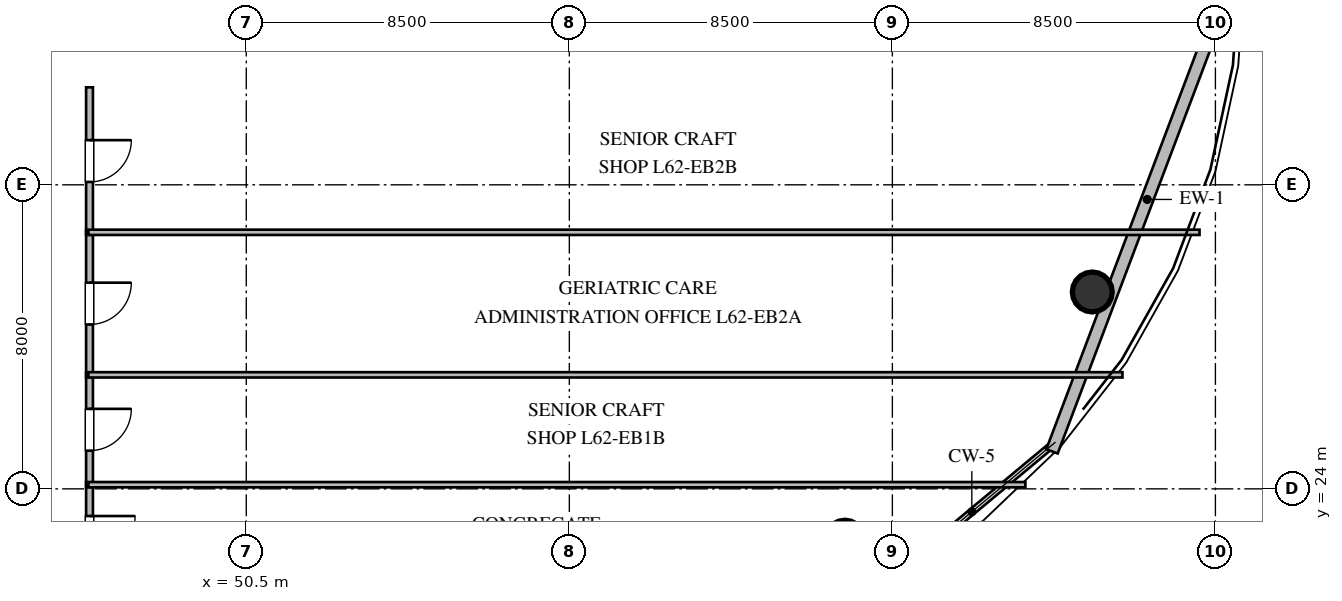
"""IFC4 building model, lengths in metres.
Left out: names, types, materials, properties, quantities, classifications, styles, units other than length and angle.
Written with IfcOpenShell. Run it as: python <this file> out.ifc"""

import sys

from ifc_helpers import new_model, si_unit, direction, frame, frame_2d, origin, origin_2d, place, context, subcontext, project, spatial, rectangle, circle, extrude, element, fill, save


model = new_model("IFC4")
c1 = context("Model", 3, precision=1e-05, world=origin(), true_north=direction((0.0, 1.0)))
c2 = subcontext(c1, "Body", "Model", "MODEL_VIEW")
j1 = project(units=[si_unit("LENGTHUNIT", "METRE"), si_unit("PLANEANGLEUNIT", "RADIAN")], contexts=[c1])
p1 = place(None, origin())
s1 = spatial("IfcSite", under=j1, at=p1, CompositionType="ELEMENT")
p2 = place(p1, origin())
s2 = spatial("IfcBuilding", under=s1, at=p2, CompositionType="ELEMENT")
p3 = place(p2, frame((0.0, 0.0, 235.2)))
s3 = spatial("IfcBuildingStorey", under=s2, at=p3, CompositionType="ELEMENT", Elevation=235.2)
for number, where, z_axis, x_axis in (
    (1, (66.25, 22.65, 0.0), (0.0, 0.0, 1.0), (1.0, 0.0, 0.0)),
    (2, (72.76, 29.18, 0.0), (0.0, 0.0, 1.0), (1.0, 0.0, 0.0)),
):
    element("IfcColumn", number, at=place(p3, frame(where, z_axis=z_axis, x_axis=x_axis)), inside=s3, PredefinedType="COLUMN", context=c2, shape_type="SweptSolid", body=[
        extrude(circle(Radius=0.525, at=origin_2d()), origin(), (0.0, 0.0, 1.0), 3.6),
    ])
p4 = place(p3, frame((76.712, 38.243, 0.0), z_axis=(0.0, 0.0, 1.0), x_axis=(-0.353659523244, -0.935374225441, 0.0)))
e3 = element("IfcWall", 3, at=p4, inside=s3, PredefinedType="STANDARD", context=c2, shape_type="SweptSolid", body=[
    extrude(rectangle(XDim=14.172, YDim=0.32, at=frame_2d((7.086, 0.0))), origin(), (0.0, 0.0, 1.0), 3.36),
])
p5 = place(p3, frame((46.375, 24.175, 0.0), z_axis=(0.0, 0.0, 1.0), x_axis=(0.0, -1.0, 0.0)))
e4 = element("IfcWall", 4, at=p5, inside=s3, PredefinedType="PARTITIONING", context=c2, shape_type="SweptSolid", body=[
    extrude(rectangle(XDim=2.98, YDim=0.18, at=frame_2d((1.49, 0.0))), origin(), (0.0, 0.0, 1.0), 3.36),
])
p6 = place(p5, frame((0.89, 0.0, 0.0)))
e5 = element("IfcOpeningElement", 5, at=p6, cuts=e4, PredefinedType="OPENING", context=c2, shape_type="SweptSolid", body=[
    extrude(rectangle(XDim=1.2, YDim=2.15, at=frame_2d((0.6, 1.075))), frame((0.0, 0.1, 0.0), z_axis=(0.0, -1.0, 0.0), x_axis=(1.0, 0.0, 0.0)), (0.0, 0.0, 1.0), 0.2),
])
p7 = place(p3, frame((46.375, 27.065, 0.0), z_axis=(0.0, 0.0, 1.0), x_axis=(0.0, -1.0, 0.0)))
e6 = element("IfcWall", 6, at=p7, inside=s3, PredefinedType="PARTITIONING", context=c2, shape_type="SweptSolid", body=[
    extrude(rectangle(XDim=3.02, YDim=0.18, at=frame_2d((1.51, 0.0))), origin(), (0.0, 0.0, 1.0), 3.36),
])
p8 = place(p7, frame((0.96, 0.0, 0.0)))
e7 = element("IfcOpeningElement", 7, at=p8, cuts=e6, PredefinedType="OPENING", context=c2, shape_type="SweptSolid", body=[
    extrude(rectangle(XDim=1.1, YDim=2.1, at=frame_2d((0.55, 1.05))), frame((0.0, 0.1, 0.0), z_axis=(0.0, -1.0, 0.0), x_axis=(1.0, 0.0, 0.0)), (0.0, 0.0, 1.0), 0.2),
])
p9 = place(p3, frame((46.375, 30.815, 0.0), z_axis=(0.0, 0.0, 1.0), x_axis=(0.0, -1.0, 0.0)))
e8 = element("IfcWall", 8, at=p9, inside=s3, PredefinedType="PARTITIONING", context=c2, shape_type="SweptSolid", body=[
    extrude(rectangle(XDim=3.88, YDim=0.18, at=frame_2d((1.94, 0.0))), origin(), (0.0, 0.0, 1.0), 3.36),
])
p10 = place(p9, frame((1.39, 0.0, 0.0)))
e9 = element("IfcOpeningElement", 9, at=p10, cuts=e8, PredefinedType="OPENING", context=c2, shape_type="SweptSolid", body=[
    extrude(rectangle(XDim=1.1, YDim=2.1, at=frame_2d((0.55, 1.05))), frame((0.0, 0.1, 0.0), z_axis=(0.0, -1.0, 0.0), x_axis=(1.0, 0.0, 0.0)), (0.0, 0.0, 1.0), 0.2),
])
p11 = place(p3, frame((46.375, 34.565, 0.0), z_axis=(0.0, 0.0, 1.0), x_axis=(0.0, -1.0, 0.0)))
e10 = element("IfcWall", 10, at=p11, inside=s3, PredefinedType="PARTITIONING", context=c2, shape_type="SweptSolid", body=[
    extrude(rectangle(XDim=3.88, YDim=0.18, at=frame_2d((1.94, 0.0))), origin(), (0.0, 0.0, 1.0), 3.36),
])
p12 = place(p11, frame((1.39, 0.0, 0.0)))
e11 = element("IfcOpeningElement", 11, at=p12, cuts=e10, PredefinedType="OPENING", context=c2, shape_type="SweptSolid", body=[
    extrude(rectangle(XDim=1.1, YDim=2.1, at=frame_2d((0.55, 1.05))), frame((0.0, 0.1, 0.0), z_axis=(0.0, -1.0, 0.0), x_axis=(1.0, 0.0, 0.0)), (0.0, 0.0, 1.0), 0.2),
])
p13 = place(p3, frame((46.345, 24.11, 0.0), z_axis=(0.0, 0.0, 1.0), x_axis=(1.0, 0.0, 0.0)))
e12 = element("IfcWall", 12, at=p13, inside=s3, PredefinedType="PARTITIONING", context=c2, shape_type="SweptSolid", body=[
    extrude(rectangle(XDim=24.655, YDim=0.14, at=frame_2d((12.328, 0.0))), origin(), (0.0, 0.0, 1.0), 2.806),
])
p14 = place(p3, frame((46.345, 27.0, 0.0), z_axis=(0.0, 0.0, 1.0), x_axis=(1.0, 0.0, 0.0)))
e13 = element("IfcWall", 13, at=p14, inside=s3, PredefinedType="PARTITIONING", context=c2, shape_type="SweptSolid", body=[
    extrude(rectangle(XDim=27.209, YDim=0.14, at=frame_2d((13.604, 0.0))), origin(), (0.0, 0.0, 1.0), 2.806),
])
p15 = place(p3, frame((46.345, 30.75, 0.0), z_axis=(0.0, 0.0, 1.0), x_axis=(1.0, 0.0, 0.0)))
e14 = element("IfcWall", 14, at=p15, inside=s3, PredefinedType="PARTITIONING", context=c2, shape_type="SweptSolid", body=[
    extrude(rectangle(XDim=29.237, YDim=0.14, at=frame_2d((14.619, 0.0))), origin(), (0.0, 0.0, 1.0), 3.36),
])
p16 = place(p6, origin())
e15 = element("IfcDoor", 15, at=p16, inside=s3, OperationType="SINGLE_SWING_LEFT", PredefinedType="DOOR", context=c2, shape_type="SweptSolid", body=[
    extrude(rectangle(XDim=1.2, YDim=2.15, at=frame_2d((0.6, 1.075))), frame((0.0, 0.025, 0.0), z_axis=(0.0, -1.0, 0.0), x_axis=(1.0, 0.0, 0.0)), (0.0, 0.0, 1.0), 0.05),
])
fill(e5, e15)
p17 = place(p8, origin())
e16 = element("IfcDoor", 16, at=p17, inside=s3, OperationType="SINGLE_SWING_LEFT", PredefinedType="DOOR", context=c2, shape_type="SweptSolid", body=[
    extrude(rectangle(XDim=1.1, YDim=2.1, at=frame_2d((0.55, 1.05))), frame((0.0, 0.025, 0.0), z_axis=(0.0, -1.0, 0.0), x_axis=(1.0, 0.0, 0.0)), (0.0, 0.0, 1.0), 0.05),
])
fill(e7, e16)
p18 = place(p10, origin())
e17 = element("IfcDoor", 17, at=p18, inside=s3, OperationType="SINGLE_SWING_LEFT", PredefinedType="DOOR", context=c2, shape_type="SweptSolid", body=[
    extrude(rectangle(XDim=1.1, YDim=2.1, at=frame_2d((0.55, 1.05))), frame((0.0, 0.025, 0.0), z_axis=(0.0, -1.0, 0.0), x_axis=(1.0, 0.0, 0.0)), (0.0, 0.0, 1.0), 0.05),
])
fill(e9, e17)
p19 = place(p12, origin())
e18 = element("IfcDoor", 18, at=p19, inside=s3, OperationType="SINGLE_SWING_LEFT", PredefinedType="DOOR", context=c2, shape_type="SweptSolid", body=[
    extrude(rectangle(XDim=1.1, YDim=2.1, at=frame_2d((0.55, 1.05))), frame((0.0, 0.025, 0.0), z_axis=(0.0, -1.0, 0.0), x_axis=(1.0, 0.0, 0.0)), (0.0, 0.0, 1.0), 0.05),
])
fill(e11, e18)
save(model, sys.argv[1])
